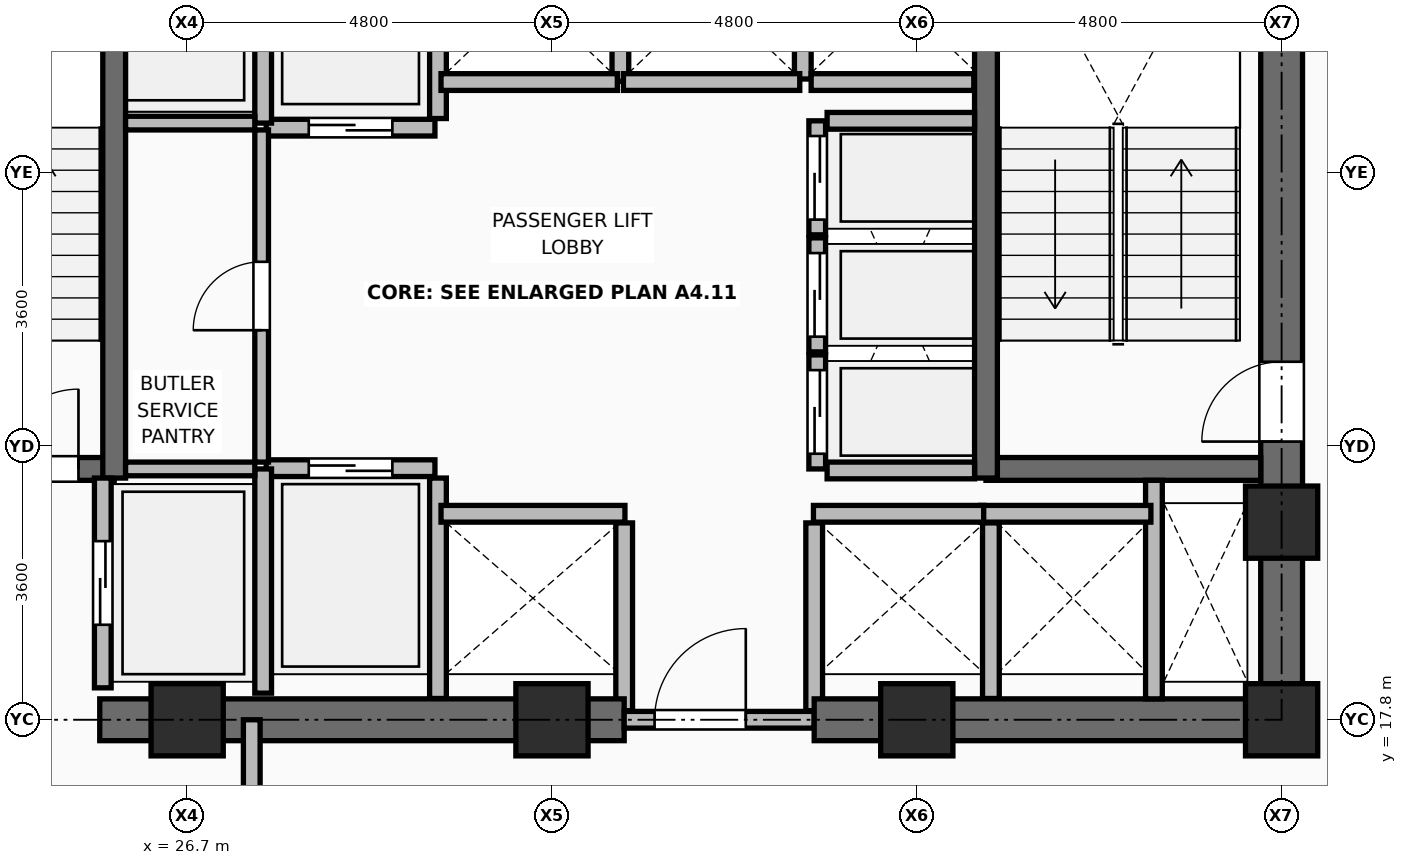
"""IFC4 building model, lengths in metres.
Left out: names, types, materials, properties, quantities, classifications, styles, units other than length and angle.
Written with IfcOpenShell. Run it as: python <this file> out.ifc"""

import sys

from ifc_helpers import new_model, si_unit, direction, frame, frame_2d, origin, origin_2d, place, context, subcontext, project, spatial, rectangle, extrude, element, fill, save


model = new_model("IFC4")
c1 = context("Model", 3, precision=1e-05, world=origin(), true_north=direction((0.0, 1.0)))
c2 = subcontext(c1, "Body", "Model", "MODEL_VIEW")
j1 = project(units=[si_unit("LENGTHUNIT", "METRE"), si_unit("PLANEANGLEUNIT", "RADIAN")], contexts=[c1])
p1 = place(None, origin())
s1 = spatial("IfcSite", under=j1, at=p1, CompositionType="ELEMENT")
p2 = place(p1, origin())
s2 = spatial("IfcBuilding", under=s1, at=p2, CompositionType="ELEMENT")
p3 = place(p2, frame((0.0, 0.0, 164.7)))
s3 = spatial("IfcBuildingStorey", under=s2, at=p3, CompositionType="ELEMENT", Elevation=164.7)
for number, where, z_axis, x_axis in (
    (1, (26.7, 17.8, 0.0), (0.0, 0.0, 1.0), (1.0, 0.0, 0.0)),
    (2, (31.5, 17.8, 0.0), (0.0, 0.0, 1.0), (1.0, 0.0, 0.0)),
    (3, (36.3, 17.8, 0.0), (0.0, 0.0, 1.0), (1.0, 0.0, 0.0)),
    (4, (41.1, 17.8, 0.0), (0.0, 0.0, 1.0), (1.0, 0.0, 0.0)),
    (5, (41.1, 20.4, 0.0), (0.0, 0.0, 1.0), (1.0, 0.0, 0.0)),
):
    element("IfcColumn", number, at=place(p3, frame(where, z_axis=z_axis, x_axis=x_axis)), inside=s3, PredefinedType="COLUMN", context=c2, shape_type="SweptSolid", body=[
        extrude(rectangle(XDim=0.95, YDim=0.95, at=origin_2d()), origin(), (0.0, 0.0, 1.0), 3.75),
    ])
p4 = place(p3, frame((30.0, 18.08, 0.0), z_axis=(0.0, 0.0, 1.0), x_axis=(0.0, 1.0, 0.0)))
e6 = element("IfcWall", 6, at=p4, inside=s3, PredefinedType="PARTITIONING", context=c2, shape_type="SweptSolid", body=[
    extrude(rectangle(XDim=2.9, YDim=0.22, at=frame_2d((1.45, 0.0))), origin(), (0.0, 0.0, 1.0), 3.545),
])
for number, where, z_axis, x_axis in (
    (7, (32.45, 17.92, 0.0), (0.0, 0.0, 1.0), (0.0, 1.0, 0.0)),
    (8, (34.95, 17.92, 0.0), (0.0, 0.0, 1.0), (0.0, 1.0, 0.0)),
):
    element("IfcWall", number, at=place(p3, frame(where, z_axis=z_axis, x_axis=x_axis)), inside=s3, PredefinedType="PARTITIONING", context=c2, shape_type="SweptSolid", body=[
        extrude(rectangle(XDim=2.47, YDim=0.22, at=frame_2d((1.235, 0.0))), origin(), (0.0, 0.0, 1.0), 3.006),
    ])
p5 = place(p3, frame((37.275, 18.08, 0.0), z_axis=(0.0, 0.0, 1.0), x_axis=(0.0, 1.0, 0.0)))
e9 = element("IfcWall", 9, at=p5, inside=s3, PredefinedType="PARTITIONING", context=c2, shape_type="SweptSolid", body=[
    extrude(rectangle(XDim=2.31, YDim=0.22, at=frame_2d((1.155, 0.0))), origin(), (0.0, 0.0, 1.0), 3.545),
])
p6 = place(p3, frame((30.0, 25.71, 0.0), z_axis=(0.0, 0.0, 1.0), x_axis=(0.0, 1.0, 0.0)))
e10 = element("IfcWall", 10, at=p6, inside=s3, PredefinedType="PARTITIONING", context=c2, shape_type="SweptSolid", body=[
    extrude(rectangle(XDim=2.73, YDim=0.22, at=frame_2d((1.365, 0.0))), origin(), (0.0, 0.0, 1.0), 3.545),
])
p7 = place(p3, frame((32.4, 26.2, 0.0), z_axis=(0.0, 0.0, 1.0), x_axis=(0.0, 1.0, 0.0)))
e11 = element("IfcWall", 11, at=p7, inside=s3, PredefinedType="PARTITIONING", context=c2, shape_type="SweptSolid", body=[
    extrude(rectangle(XDim=2.24, YDim=0.22, at=frame_2d((1.12, 0.0))), origin(), (0.0, 0.0, 1.0), 3.545),
])
p8 = place(p3, frame((34.8, 26.23, 0.0), z_axis=(0.0, 0.0, 1.0), x_axis=(0.0, 1.0, 0.0)))
e12 = element("IfcWall", 12, at=p8, inside=s3, PredefinedType="PARTITIONING", context=c2, shape_type="SweptSolid", body=[
    extrude(rectangle(XDim=2.21, YDim=0.22, at=frame_2d((1.105, 0.0))), origin(), (0.0, 0.0, 1.0), 3.545),
])
p9 = place(p3, frame((34.91, 26.19, 0.0), z_axis=(0.0, 0.0, 1.0), x_axis=(1.0, 0.0, 0.0)))
e13 = element("IfcWall", 13, at=p9, inside=s3, PredefinedType="PARTITIONING", context=c2, shape_type="SweptSolid", body=[
    extrude(rectangle(XDim=2.14, YDim=0.22, at=frame_2d((1.07, 0.0))), origin(), (0.0, 0.0, 1.0), 3.545),
])
p10 = place(p3, frame((25.55, 17.8, 0.0), z_axis=(0.0, 0.0, 1.0), x_axis=(1.0, 0.0, 0.0)))
e14 = element("IfcWall", 14, at=p10, inside=s3, PredefinedType="SHEAR", context=c2, shape_type="SweptSolid", body=[
    extrude(rectangle(XDim=6.9, YDim=0.55, at=frame_2d((3.45, 0.0))), origin(), (0.0, 0.0, 1.0), 3.57),
])
p11 = place(p3, frame((32.45, 17.8, 0.0), z_axis=(0.0, 0.0, 1.0), x_axis=(1.0, 0.0, 0.0)))
e15 = element("IfcWall", 15, at=p11, inside=s3, PredefinedType="PARTITIONING", context=c2, shape_type="SweptSolid", body=[
    extrude(rectangle(XDim=2.5, YDim=0.22, at=frame_2d((1.25, 0.0))), origin(), (0.0, 0.0, 1.0), 3.006),
])
p12 = place(p11, frame((0.4, 0.0, 0.0)))
e16 = element("IfcOpeningElement", 16, at=p12, cuts=e15, PredefinedType="OPENING", context=c2, shape_type="SweptSolid", body=[
    extrude(rectangle(XDim=1.2, YDim=2.1, at=frame_2d((0.6, 1.05))), frame((0.0, 0.12, 0.0), z_axis=(0.0, -1.0, 0.0), x_axis=(1.0, 0.0, 0.0)), (0.0, 0.0, 1.0), 0.24),
])
p13 = place(p3, frame((34.95, 17.8, 0.0), z_axis=(0.0, 0.0, 1.0), x_axis=(1.0, 0.0, 0.0)))
e17 = element("IfcWall", 17, at=p13, inside=s3, PredefinedType="SHEAR", context=c2, shape_type="SweptSolid", body=[
    extrude(rectangle(XDim=6.425, YDim=0.55, at=frame_2d((3.212, 0.0))), origin(), (0.0, 0.0, 1.0), 3.57),
])
p14 = place(p3, frame((41.1, 18.075, 0.0), z_axis=(0.0, 0.0, 1.0), x_axis=(0.0, 1.0, 0.0)))
e18 = element("IfcWall", 18, at=p14, inside=s3, PredefinedType="SHEAR", context=c2, shape_type="SweptSolid", body=[
    extrude(rectangle(XDim=14.1, YDim=0.55, at=frame_2d((7.05, 0.0))), origin(), (0.0, 0.0, 1.0), 3.57),
])
p15 = place(p14, frame((3.385, 0.0, 0.0)))
e19 = element("IfcOpeningElement", 19, at=p15, cuts=e18, PredefinedType="OPENING", context=c2, shape_type="SweptSolid", body=[
    extrude(rectangle(XDim=1.05, YDim=2.1, at=frame_2d((0.525, 1.05))), frame((0.0, 0.285, 0.0), z_axis=(0.0, -1.0, 0.0), x_axis=(1.0, 0.0, 0.0)), (0.0, 0.0, 1.0), 0.57),
])
p16 = place(p3, frame((22.175, 21.1, 0.0), z_axis=(0.0, 0.0, 1.0), x_axis=(1.0, 0.0, 0.0)))
e20 = element("IfcWall", 20, at=p16, inside=s3, PredefinedType="SHEAR", context=c2, shape_type="SweptSolid", body=[
    extrude(rectangle(XDim=3.565, YDim=0.3, at=frame_2d((1.782, 0.0))), origin(), (0.0, 0.0, 1.0), 3.57),
])
p17 = place(p16, frame((2.045, 0.0, 0.0)))
e21 = element("IfcOpeningElement", 21, at=p17, cuts=e20, PredefinedType="OPENING", context=c2, shape_type="SweptSolid", body=[
    extrude(rectangle(XDim=1.05, YDim=2.1, at=frame_2d((0.525, 1.05))), frame((0.0, 0.16, 0.0), z_axis=(0.0, -1.0, 0.0), x_axis=(1.0, 0.0, 0.0)), (0.0, 0.0, 1.0), 0.32),
])
p18 = place(p3, frame((25.74, 20.98, 0.0), z_axis=(0.0, 0.0, 1.0), x_axis=(0.0, 1.0, 0.0)))
e22 = element("IfcWall", 22, at=p18, inside=s3, PredefinedType="SHEAR", context=c2, shape_type="SweptSolid", body=[
    extrude(rectangle(XDim=7.99, YDim=0.3, at=frame_2d((3.995, 0.0))), origin(), (0.0, 0.0, 1.0), 3.57),
])
p19 = place(p3, frame((37.21, 21.1, 0.0), z_axis=(0.0, 0.0, 1.0), x_axis=(1.0, 0.0, 0.0)))
e23 = element("IfcWall", 23, at=p19, inside=s3, PredefinedType="SHEAR", context=c2, shape_type="SweptSolid", body=[
    extrude(rectangle(XDim=3.615, YDim=0.3, at=frame_2d((1.808, 0.0))), origin(), (0.0, 0.0, 1.0), 3.57),
])
p20 = place(p3, frame((37.21, 20.98, 0.0), z_axis=(0.0, 0.0, 1.0), x_axis=(0.0, 1.0, 0.0)))
e24 = element("IfcWall", 24, at=p20, inside=s3, PredefinedType="SHEAR", context=c2, shape_type="SweptSolid", body=[
    extrude(rectangle(XDim=7.99, YDim=0.3, at=frame_2d((3.995, 0.0))), origin(), (0.0, 0.0, 1.0), 3.57),
])
p21 = place(p3, frame((39.42, 18.075, 0.0), z_axis=(0.0, 0.0, 1.0), x_axis=(0.0, 1.0, 0.0)))
e25 = element("IfcWall", 25, at=p21, inside=s3, PredefinedType="PARTITIONING", context=c2, shape_type="SweptSolid", body=[
    extrude(rectangle(XDim=2.875, YDim=0.22, at=frame_2d((1.438, 0.0))), origin(), (0.0, 0.0, 1.0), 3.55),
])
p22 = place(p3, frame((25.59, 18.22, 0.0), z_axis=(0.0, 0.0, 1.0), x_axis=(0.0, 1.0, 0.0)))
e26 = element("IfcWall", 26, at=p22, inside=s3, PredefinedType="PARTITIONING", context=c2, shape_type="SweptSolid", body=[
    extrude(rectangle(XDim=2.76, YDim=0.22, at=frame_2d((1.38, 0.0))), origin(), (0.0, 0.0, 1.0), 3.55),
])
p23 = place(p22, frame((0.83, 0.0, 0.0)))
e27 = element("IfcOpeningElement", 27, at=p23, cuts=e26, PredefinedType="OPENING", context=c2, shape_type="SweptSolid", body=[
    extrude(rectangle(XDim=1.1, YDim=2.2, at=frame_2d((0.55, 1.1))), frame((0.0, 0.12, 0.0), z_axis=(0.0, -1.0, 0.0), x_axis=(1.0, 0.0, 0.0)), (0.0, 0.0, 1.0), 0.24),
])
p24 = place(p3, frame((27.74, 21.11, 0.0), z_axis=(0.0, 0.0, 1.0), x_axis=(1.0, 0.0, 0.0)))
e28 = element("IfcWall", 28, at=p24, inside=s3, PredefinedType="PARTITIONING", context=c2, shape_type="SweptSolid", body=[
    extrude(rectangle(XDim=2.22, YDim=0.22, at=frame_2d((1.11, 0.0))), origin(), (0.0, 0.0, 1.0), 3.55),
])
p25 = place(p24, frame((0.56, 0.0, 0.0)))
e29 = element("IfcOpeningElement", 29, at=p25, cuts=e28, PredefinedType="OPENING", context=c2, shape_type="SweptSolid", body=[
    extrude(rectangle(XDim=1.1, YDim=2.2, at=frame_2d((0.55, 1.1))), frame((0.0, 0.12, 0.0), z_axis=(0.0, -1.0, 0.0), x_axis=(1.0, 0.0, 0.0)), (0.0, 0.0, 1.0), 0.24),
])
p26 = place(p3, frame((27.74, 25.59, 0.0), z_axis=(0.0, 0.0, 1.0), x_axis=(1.0, 0.0, 0.0)))
e30 = element("IfcWall", 30, at=p26, inside=s3, PredefinedType="PARTITIONING", context=c2, shape_type="SweptSolid", body=[
    extrude(rectangle(XDim=2.22, YDim=0.22, at=frame_2d((1.11, 0.0))), origin(), (0.0, 0.0, 1.0), 3.55),
])
p27 = place(p26, frame((0.56, 0.0, 0.0)))
e31 = element("IfcOpeningElement", 31, at=p27, cuts=e30, PredefinedType="OPENING", context=c2, shape_type="SweptSolid", body=[
    extrude(rectangle(XDim=1.1, YDim=2.2, at=frame_2d((0.55, 1.1))), frame((0.0, 0.12, 0.0), z_axis=(0.0, -1.0, 0.0), x_axis=(1.0, 0.0, 0.0)), (0.0, 0.0, 1.0), 0.24),
])
p28 = place(p3, frame((30.04, 20.51, 0.0), z_axis=(0.0, 0.0, 1.0), x_axis=(1.0, 0.0, 0.0)))
e32 = element("IfcWall", 32, at=p28, inside=s3, PredefinedType="PARTITIONING", context=c2, shape_type="SweptSolid", body=[
    extrude(rectangle(XDim=2.42, YDim=0.22, at=frame_2d((1.21, 0.0))), origin(), (0.0, 0.0, 1.0), 3.55),
])
for number, where, z_axis, x_axis in (
    (33, (37.14, 20.51, 0.0), (0.0, 0.0, 1.0), (1.0, 0.0, 0.0)),
    (34, (34.94, 20.51, 0.0), (0.0, 0.0, 1.0), (1.0, 0.0, 0.0)),
):
    element("IfcWall", number, at=place(p3, frame(where, z_axis=z_axis, x_axis=x_axis)), inside=s3, PredefinedType="PARTITIONING", context=c2, shape_type="SweptSolid", body=[
        extrude(rectangle(XDim=2.24, YDim=0.22, at=frame_2d((1.12, 0.0))), origin(), (0.0, 0.0, 1.0), 3.55),
    ])
for number, where, z_axis, x_axis in (
    (35, (30.04, 26.19, 0.0), (0.0, 0.0, 1.0), (1.0, 0.0, 0.0)),
    (36, (32.44, 26.19, 0.0), (0.0, 0.0, 1.0), (1.0, 0.0, 0.0)),
):
    element("IfcWall", number, at=place(p3, frame(where, z_axis=z_axis, x_axis=x_axis)), inside=s3, PredefinedType="PARTITIONING", context=c2, shape_type="SweptSolid", body=[
        extrude(rectangle(XDim=2.32, YDim=0.22, at=frame_2d((1.16, 0.0))), origin(), (0.0, 0.0, 1.0), 3.55),
    ])
p29 = place(p3, frame((34.99, 21.1, 0.0), z_axis=(0.0, 0.0, 1.0), x_axis=(0.0, 1.0, 0.0)))
e37 = element("IfcWall", 37, at=p29, inside=s3, PredefinedType="PARTITIONING", context=c2, shape_type="SweptSolid", body=[
    extrude(rectangle(XDim=1.5, YDim=0.22, at=frame_2d((0.75, 0.0))), origin(), (0.0, 0.0, 1.0), 3.55),
])
p30 = place(p29, frame((0.2, 0.0, 0.0)))
e38 = element("IfcOpeningElement", 38, at=p30, cuts=e37, PredefinedType="OPENING", context=c2, shape_type="SweptSolid", body=[
    extrude(rectangle(XDim=1.1, YDim=2.2, at=frame_2d((0.55, 1.1))), frame((0.0, 0.12, 0.0), z_axis=(0.0, -1.0, 0.0), x_axis=(1.0, 0.0, 0.0)), (0.0, 0.0, 1.0), 0.24),
])
p31 = place(p3, frame((34.99, 22.64, 0.0), z_axis=(0.0, 0.0, 1.0), x_axis=(0.0, 1.0, 0.0)))
e39 = element("IfcWall", 39, at=p31, inside=s3, PredefinedType="PARTITIONING", context=c2, shape_type="SweptSolid", body=[
    extrude(rectangle(XDim=1.5, YDim=0.22, at=frame_2d((0.75, 0.0))), origin(), (0.0, 0.0, 1.0), 3.55),
])
p32 = place(p31, frame((0.2, 0.0, 0.0)))
e40 = element("IfcOpeningElement", 40, at=p32, cuts=e39, PredefinedType="OPENING", context=c2, shape_type="SweptSolid", body=[
    extrude(rectangle(XDim=1.1, YDim=2.2, at=frame_2d((0.55, 1.1))), frame((0.0, 0.12, 0.0), z_axis=(0.0, -1.0, 0.0), x_axis=(1.0, 0.0, 0.0)), (0.0, 0.0, 1.0), 0.24),
])
p33 = place(p3, frame((34.99, 24.18, 0.0), z_axis=(0.0, 0.0, 1.0), x_axis=(0.0, 1.0, 0.0)))
e41 = element("IfcWall", 41, at=p33, inside=s3, PredefinedType="PARTITIONING", context=c2, shape_type="SweptSolid", body=[
    extrude(rectangle(XDim=1.5, YDim=0.22, at=frame_2d((0.75, 0.0))), origin(), (0.0, 0.0, 1.0), 3.55),
])
p34 = place(p33, frame((0.2, 0.0, 0.0)))
e42 = element("IfcOpeningElement", 42, at=p34, cuts=e41, PredefinedType="OPENING", context=c2, shape_type="SweptSolid", body=[
    extrude(rectangle(XDim=1.1, YDim=2.2, at=frame_2d((0.55, 1.1))), frame((0.0, 0.12, 0.0), z_axis=(0.0, -1.0, 0.0), x_axis=(1.0, 0.0, 0.0)), (0.0, 0.0, 1.0), 0.24),
])
p35 = place(p3, frame((27.7, 18.15, 0.0), z_axis=(0.0, 0.0, 1.0), x_axis=(0.0, 1.0, 0.0)))
e43 = element("IfcWall", 43, at=p35, inside=s3, PredefinedType="PARTITIONING", context=c2, shape_type="SweptSolid", body=[
    extrude(rectangle(XDim=2.95, YDim=0.22, at=frame_2d((1.475, 0.0))), origin(), (0.0, 0.0, 1.0), 3.55),
])
p36 = place(p3, frame((27.7, 25.65, 0.0), z_axis=(0.0, 0.0, 1.0), x_axis=(0.0, 1.0, 0.0)))
e44 = element("IfcWall", 44, at=p36, inside=s3, PredefinedType="PARTITIONING", context=c2, shape_type="SweptSolid", body=[
    extrude(rectangle(XDim=3.0, YDim=0.22, at=frame_2d((1.5, 0.0))), origin(), (0.0, 0.0, 1.0), 3.55),
])
for number, where, z_axis, x_axis in (
    (45, (35.12, 21.08, 0.0), (0.0, 0.0, 1.0), (1.0, 0.0, 0.0)),
    (46, (35.12, 25.68, 0.0), (0.0, 0.0, 1.0), (1.0, 0.0, 0.0)),
):
    element("IfcWall", number, at=place(p3, frame(where, z_axis=z_axis, x_axis=x_axis)), inside=s3, PredefinedType="PARTITIONING", context=c2, shape_type="SweptSolid", body=[
        extrude(rectangle(XDim=1.94, YDim=0.22, at=frame_2d((0.97, 0.0))), origin(), (0.0, 0.0, 1.0), 3.55),
    ])
for number, where, z_axis, x_axis in (
    (47, (25.89, 21.1, 0.0), (0.0, 0.0, 1.0), (1.0, 0.0, 0.0)),
    (48, (25.89, 25.65, 0.0), (0.0, 0.0, 1.0), (1.0, 0.0, 0.0)),
):
    element("IfcWall", number, at=place(p3, frame(where, z_axis=z_axis, x_axis=x_axis)), inside=s3, PredefinedType="PARTITIONING", context=c2, shape_type="SweptSolid", body=[
        extrude(rectangle(XDim=1.7, YDim=0.18, at=frame_2d((0.85, 0.0))), origin(), (0.0, 0.0, 1.0), 3.55),
    ])
p37 = place(p3, frame((27.68, 21.19, 0.0), z_axis=(0.0, 0.0, 1.0), x_axis=(0.0, 1.0, 0.0)))
e49 = element("IfcWall", 49, at=p37, inside=s3, PredefinedType="PARTITIONING", context=c2, shape_type="SweptSolid", body=[
    extrude(rectangle(XDim=4.37, YDim=0.18, at=frame_2d((2.185, 0.0))), origin(), (0.0, 0.0, 1.0), 3.55),
])
p38 = place(p37, frame((1.735, 0.0, 0.0)))
e50 = element("IfcOpeningElement", 50, at=p38, cuts=e49, PredefinedType="OPENING", context=c2, shape_type="SweptSolid", body=[
    extrude(rectangle(XDim=0.9, YDim=2.1, at=frame_2d((0.45, 1.05))), frame((0.0, 0.1, 0.0), z_axis=(0.0, -1.0, 0.0), x_axis=(1.0, 0.0, 0.0)), (0.0, 0.0, 1.0), 0.2),
])
p39 = place(p3, frame((27.55, 14.35, 0.0), z_axis=(0.0, 0.0, 1.0), x_axis=(0.0, 1.0, 0.0)))
e51 = element("IfcWall", 51, at=p39, inside=s3, PredefinedType="PARTITIONING", context=c2, shape_type="SweptSolid", body=[
    extrude(rectangle(XDim=3.45, YDim=0.22, at=frame_2d((1.725, 0.0))), origin(), (0.0, 0.0, 1.0), 3.006),
])
p40 = place(p39, frame((1.175, 0.0, 0.0)))
e52 = element("IfcOpeningElement", 52, at=p40, cuts=e51, PredefinedType="OPENING", context=c2, shape_type="SweptSolid", body=[
    extrude(rectangle(XDim=1.1, YDim=2.1, at=frame_2d((0.55, 1.05))), frame((0.0, 0.12, 0.0), z_axis=(0.0, -1.0, 0.0), x_axis=(1.0, 0.0, 0.0)), (0.0, 0.0, 1.0), 0.24),
])
p41 = place(p12, origin())
e53 = element("IfcDoor", 53, at=p41, inside=s3, OperationType="SINGLE_SWING_RIGHT", PredefinedType="DOOR", context=c2, shape_type="SweptSolid", body=[
    extrude(rectangle(XDim=1.2, YDim=2.1, at=frame_2d((0.6, 1.05))), frame((0.0, 0.025, 0.0), z_axis=(0.0, -1.0, 0.0), x_axis=(1.0, 0.0, 0.0)), (0.0, 0.0, 1.0), 0.05),
])
fill(e16, e53)
p42 = place(p17, origin())
e54 = element("IfcDoor", 54, at=p42, inside=s3, OperationType="SINGLE_SWING_RIGHT", PredefinedType="DOOR", context=c2, shape_type="SweptSolid", body=[
    extrude(rectangle(XDim=1.05, YDim=2.1, at=frame_2d((0.525, 1.05))), frame((0.0, 0.025, 0.0), z_axis=(0.0, -1.0, 0.0), x_axis=(1.0, 0.0, 0.0)), (0.0, 0.0, 1.0), 0.05),
])
fill(e21, e54)
p43 = place(p15, origin())
e55 = element("IfcDoor", 55, at=p43, inside=s3, OperationType="SINGLE_SWING_LEFT", PredefinedType="DOOR", context=c2, shape_type="SweptSolid", body=[
    extrude(rectangle(XDim=1.05, YDim=2.1, at=frame_2d((0.525, 1.05))), frame((0.0, 0.025, 0.0), z_axis=(0.0, -1.0, 0.0), x_axis=(1.0, 0.0, 0.0)), (0.0, 0.0, 1.0), 0.05),
])
fill(e19, e55)
p44 = place(p23, origin())
e56 = element("IfcDoor", 56, at=p44, inside=s3, OperationType="DOUBLE_DOOR_SLIDING", PredefinedType="DOOR", context=c2, shape_type="SweptSolid", body=[
    extrude(rectangle(XDim=1.1, YDim=2.2, at=frame_2d((0.55, 1.1))), frame((0.0, 0.025, 0.0), z_axis=(0.0, -1.0, 0.0), x_axis=(1.0, 0.0, 0.0)), (0.0, 0.0, 1.0), 0.05),
])
fill(e27, e56)
p45 = place(p25, origin())
e57 = element("IfcDoor", 57, at=p45, inside=s3, OperationType="DOUBLE_DOOR_SLIDING", PredefinedType="DOOR", context=c2, shape_type="SweptSolid", body=[
    extrude(rectangle(XDim=1.1, YDim=2.2, at=frame_2d((0.55, 1.1))), frame((0.0, 0.025, 0.0), z_axis=(0.0, -1.0, 0.0), x_axis=(1.0, 0.0, 0.0)), (0.0, 0.0, 1.0), 0.05),
])
fill(e29, e57)
p46 = place(p27, frame((1.1, 0.0, 0.0), z_axis=(0.0, 0.0, 1.0), x_axis=(-1.0, 0.0, 0.0)))
e58 = element("IfcDoor", 58, at=p46, inside=s3, OperationType="DOUBLE_DOOR_SLIDING", PredefinedType="DOOR", context=c2, shape_type="SweptSolid", body=[
    extrude(rectangle(XDim=1.1, YDim=2.2, at=frame_2d((0.55, 1.1))), frame((0.0, 0.025, 0.0), z_axis=(0.0, -1.0, 0.0), x_axis=(1.0, 0.0, 0.0)), (0.0, 0.0, 1.0), 0.05),
])
fill(e31, e58)
p47 = place(p30, origin())
e59 = element("IfcDoor", 59, at=p47, inside=s3, OperationType="DOUBLE_DOOR_SLIDING", PredefinedType="DOOR", context=c2, shape_type="SweptSolid", body=[
    extrude(rectangle(XDim=1.1, YDim=2.2, at=frame_2d((0.55, 1.1))), frame((0.0, 0.025, 0.0), z_axis=(0.0, -1.0, 0.0), x_axis=(1.0, 0.0, 0.0)), (0.0, 0.0, 1.0), 0.05),
])
fill(e38, e59)
p48 = place(p32, origin())
e60 = element("IfcDoor", 60, at=p48, inside=s3, OperationType="DOUBLE_DOOR_SLIDING", PredefinedType="DOOR", context=c2, shape_type="SweptSolid", body=[
    extrude(rectangle(XDim=1.1, YDim=2.2, at=frame_2d((0.55, 1.1))), frame((0.0, 0.025, 0.0), z_axis=(0.0, -1.0, 0.0), x_axis=(1.0, 0.0, 0.0)), (0.0, 0.0, 1.0), 0.05),
])
fill(e40, e60)
p49 = place(p34, origin())
e61 = element("IfcDoor", 61, at=p49, inside=s3, OperationType="DOUBLE_DOOR_SLIDING", PredefinedType="DOOR", context=c2, shape_type="SweptSolid", body=[
    extrude(rectangle(XDim=1.1, YDim=2.2, at=frame_2d((0.55, 1.1))), frame((0.0, 0.025, 0.0), z_axis=(0.0, -1.0, 0.0), x_axis=(1.0, 0.0, 0.0)), (0.0, 0.0, 1.0), 0.05),
])
fill(e42, e61)
p50 = place(p38, origin())
e62 = element("IfcDoor", 62, at=p50, inside=s3, OperationType="SINGLE_SWING_LEFT", PredefinedType="DOOR", context=c2, shape_type="SweptSolid", body=[
    extrude(rectangle(XDim=0.9, YDim=2.1, at=frame_2d((0.45, 1.05))), frame((0.0, 0.025, 0.0), z_axis=(0.0, -1.0, 0.0), x_axis=(1.0, 0.0, 0.0)), (0.0, 0.0, 1.0), 0.05),
])
fill(e50, e62)
save(model, sys.argv[1])
